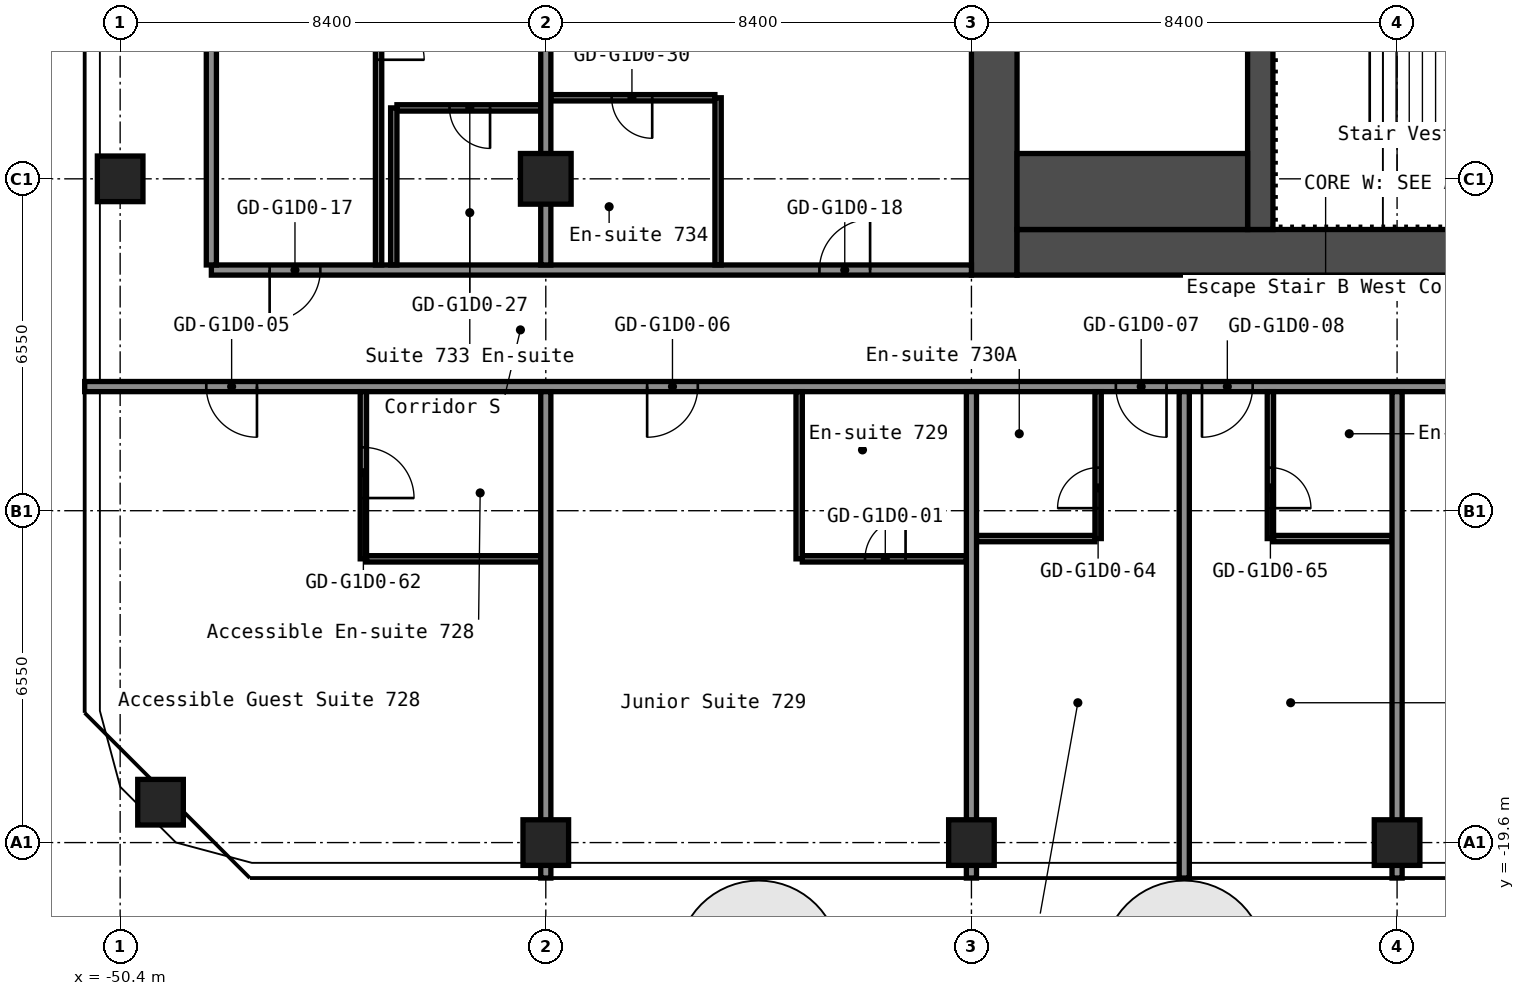
"""IFC4 building model, lengths in metres.
Left out: names, types, materials, properties, quantities, classifications, styles, units other than length and angle.
Written with IfcOpenShell. Run it as: python <this file> out.ifc"""

import sys

from ifc_helpers import new_model, si_unit, direction, frame, frame_2d, origin, origin_2d, place, context, subcontext, project, spatial, rectangle, hollow_rectangle, extrude, element, fill, save


model = new_model("IFC4")
c1 = context("Model", 3, precision=1e-05, world=origin(), true_north=direction((0.0, 1.0)))
c2 = subcontext(c1, "Body", "Model", "MODEL_VIEW")
j1 = project(units=[si_unit("LENGTHUNIT", "METRE"), si_unit("PLANEANGLEUNIT", "RADIAN")], contexts=[c1])
p1 = place(None, origin())
s1 = spatial("IfcSite", under=j1, at=p1, CompositionType="ELEMENT")
p2 = place(p1, origin())
s2 = spatial("IfcBuilding", under=s1, at=p2, CompositionType="ELEMENT")
p3 = place(p2, frame((0.0, 0.0, 29.4)))
s3 = spatial("IfcBuildingStorey", under=s2, at=p3, CompositionType="ELEMENT", Elevation=29.4)
for number, where, z_axis, x_axis in (
    (1, (-49.603, -18.803, 0.0), (0.0, 0.0, 1.0), (1.0, 0.0, 0.0)),
    (2, (-50.4, -6.5, 0.0), (0.0, 0.0, 1.0), (1.0, 0.0, 0.0)),
    (3, (-42.0, -19.6, 0.0), (0.0, 0.0, 1.0), (1.0, 0.0, 0.0)),
):
    element("IfcColumn", number, at=place(p3, frame(where, z_axis=z_axis, x_axis=x_axis)), inside=s3, PredefinedType="COLUMN", context=c2, shape_type="SweptSolid", body=[
        extrude(hollow_rectangle(XDim=0.9, YDim=0.9, WallThickness=0.036, at=origin_2d()), origin(), (0.0, 0.0, 1.0), 2.8),
    ])
p4 = place(p3, frame((-42.0, -6.5, 0.0), z_axis=(0.0, 0.0, 1.0), x_axis=(1.0, 0.0, 0.0)))
e4 = element("IfcColumn", 4, at=p4, inside=s3, PredefinedType="COLUMN", context=c2, shape_type="SweptSolid", body=[
    extrude(hollow_rectangle(XDim=1.0, YDim=1.0, WallThickness=0.04, at=origin_2d()), origin(), (0.0, 0.0, 1.0), 2.8),
])
for number, where, z_axis, x_axis in (
    (5, (-33.6, -19.6, 0.0), (0.0, 0.0, 1.0), (1.0, 0.0, 0.0)),
    (6, (-25.2, -19.6, 0.0), (0.0, 0.0, 1.0), (1.0, 0.0, 0.0)),
):
    element("IfcColumn", number, at=place(p3, frame(where, z_axis=z_axis, x_axis=x_axis)), inside=s3, PredefinedType="COLUMN", context=c2, shape_type="SweptSolid", body=[
        extrude(hollow_rectangle(XDim=0.9, YDim=0.9, WallThickness=0.036, at=origin_2d()), origin(), (0.0, 0.0, 1.0), 2.8),
    ])
p5 = place(p3, frame((-33.15, -8.4, 0.0), z_axis=(0.0, 0.0, 1.0), x_axis=(0.0, 1.0, 0.0)))
e7 = element("IfcWall", 7, at=p5, inside=s3, PredefinedType="SHEAR", context=c2, shape_type="SweptSolid", body=[
    extrude(rectangle(XDim=16.8, YDim=0.9, at=frame_2d((8.4, 0.0))), origin(), (0.0, 0.0, 1.0), 2.8),
])
p6 = place(p3, frame((-32.7, -7.95, 0.0), z_axis=(0.0, 0.0, 1.0), x_axis=(1.0, 0.0, 0.0)))
e8 = element("IfcWall", 8, at=p6, inside=s3, PredefinedType="SHEAR", context=c2, shape_type="SweptSolid", body=[
    extrude(rectangle(XDim=15.0, YDim=0.9, at=frame_2d((7.5, 0.0))), origin(), (0.0, 0.0, 1.0), 2.8),
])
p7 = place(p6, frame((11.45, 0.0, 0.0)))
e9 = element("IfcOpeningElement", 9, at=p7, cuts=e8, PredefinedType="OPENING", context=c2, shape_type="SweptSolid", body=[
    extrude(rectangle(XDim=1.0, YDim=2.1, at=frame_2d((0.5, 1.05))), frame((0.0, 0.46, 0.0), z_axis=(0.0, -1.0, 0.0), x_axis=(1.0, 0.0, 0.0)), (0.0, 0.0, 1.0), 0.92),
])
p8 = place(p3, frame((-27.9, -7.5, 0.0), z_axis=(0.0, 0.0, 1.0), x_axis=(0.0, 1.0, 0.0)))
e10 = element("IfcWall", 10, at=p8, inside=s3, PredefinedType="SHEAR", context=c2, shape_type="SweptSolid", body=[
    extrude(rectangle(XDim=3.75, YDim=0.5, at=frame_2d((1.875, 0.0))), origin(), (0.0, 0.0, 1.0), 2.8),
])
p9 = place(p3, frame((-32.7, -6.75, 0.0), z_axis=(0.0, 0.0, 1.0), x_axis=(1.0, 0.0, 0.0)))
e11 = element("IfcWall", 11, at=p9, inside=s3, PredefinedType="SHEAR", context=c2, shape_type="SweptSolid", body=[
    extrude(rectangle(XDim=4.55, YDim=1.5, at=frame_2d((2.275, 0.0))), origin(), (0.0, 0.0, 1.0), 2.8),
])
p10 = place(p3, frame((-45.538, -14.0, 0.0), z_axis=(0.0, 0.0, 1.0), x_axis=(1.0, 0.0, 0.0)))
e12 = element("IfcWall", 12, at=p10, inside=s3, PredefinedType="PARTITIONING", context=c2, shape_type="SweptSolid", body=[
    extrude(rectangle(XDim=3.438, YDim=0.125, at=frame_2d((1.719, 0.0))), origin(), (0.0, 0.0, 1.0), 2.8),
])
p11 = place(p3, frame((-36.938, -14.0, 0.0), z_axis=(0.0, 0.0, 1.0), x_axis=(1.0, 0.0, 0.0)))
e13 = element("IfcWall", 13, at=p11, inside=s3, PredefinedType="PARTITIONING", context=c2, shape_type="SweptSolid", body=[
    extrude(rectangle(XDim=3.238, YDim=0.125, at=frame_2d((1.619, 0.0))), origin(), (0.0, 0.0, 1.0), 2.8),
])
p12 = place(p11, frame((1.238, 0.0, 0.0)))
e14 = element("IfcOpeningElement", 14, at=p12, cuts=e13, PredefinedType="OPENING", context=c2, shape_type="SweptSolid", body=[
    extrude(rectangle(XDim=0.8, YDim=2.1, at=frame_2d((0.4, 1.05))), frame((0.0, 0.073, 0.0), z_axis=(0.0, -1.0, 0.0), x_axis=(1.0, 0.0, 0.0)), (0.0, 0.0, 1.0), 0.145),
])
for number, where, z_axis, x_axis in (
    (15, (-33.5, -13.6, 0.0), (0.0, 0.0, 1.0), (1.0, 0.0, 0.0)),
    (16, (-27.637, -13.6, 0.0), (0.0, 0.0, 1.0), (1.0, 0.0, 0.0)),
):
    element("IfcWall", number, at=place(p3, frame(where, z_axis=z_axis, x_axis=x_axis)), inside=s3, PredefinedType="PARTITIONING", context=c2, shape_type="SweptSolid", body=[
        extrude(rectangle(XDim=2.337, YDim=0.125, at=frame_2d((1.169, 0.0))), origin(), (0.0, 0.0, 1.0), 2.8),
    ])
p13 = place(p3, frame((-51.1, -10.6, 0.0), z_axis=(0.0, 0.0, 1.0), x_axis=(1.0, 0.0, 0.0)))
e17 = element("IfcWall", 17, at=p13, inside=s3, PredefinedType="PARTITIONING", context=c2, shape_type="SweptSolid", body=[
    extrude(rectangle(XDim=34.3, YDim=0.2, at=frame_2d((17.15, 0.0))), origin(), (0.0, 0.0, 1.0), 2.8),
])
p14 = place(p13, frame((2.4, 0.0, 0.0)))
e18 = element("IfcOpeningElement", 18, at=p14, cuts=e17, PredefinedType="OPENING", context=c2, shape_type="SweptSolid", body=[
    extrude(rectangle(XDim=1.0, YDim=2.1, at=frame_2d((0.5, 1.05))), frame((0.0, 0.11, 0.0), z_axis=(0.0, -1.0, 0.0), x_axis=(1.0, 0.0, 0.0)), (0.0, 0.0, 1.0), 0.22),
])
p15 = place(p13, frame((11.1, 0.0, 0.0)))
e19 = element("IfcOpeningElement", 19, at=p15, cuts=e17, PredefinedType="OPENING", context=c2, shape_type="SweptSolid", body=[
    extrude(rectangle(XDim=1.0, YDim=2.1, at=frame_2d((0.5, 1.05))), frame((0.0, 0.11, 0.0), z_axis=(0.0, -1.0, 0.0), x_axis=(1.0, 0.0, 0.0)), (0.0, 0.0, 1.0), 0.22),
])
p16 = place(p13, frame((20.35, 0.0, 0.0)))
e20 = element("IfcOpeningElement", 20, at=p16, cuts=e17, PredefinedType="OPENING", context=c2, shape_type="SweptSolid", body=[
    extrude(rectangle(XDim=1.0, YDim=2.1, at=frame_2d((0.5, 1.05))), frame((0.0, 0.11, 0.0), z_axis=(0.0, -1.0, 0.0), x_axis=(1.0, 0.0, 0.0)), (0.0, 0.0, 1.0), 0.22),
])
p17 = place(p13, frame((22.05, 0.0, 0.0)))
e21 = element("IfcOpeningElement", 21, at=p17, cuts=e17, PredefinedType="OPENING", context=c2, shape_type="SweptSolid", body=[
    extrude(rectangle(XDim=1.0, YDim=2.1, at=frame_2d((0.5, 1.05))), frame((0.0, 0.11, 0.0), z_axis=(0.0, -1.0, 0.0), x_axis=(1.0, 0.0, 0.0)), (0.0, 0.0, 1.0), 0.22),
])
p18 = place(p13, frame((27.9, 0.0, 0.0)))
e22 = element("IfcOpeningElement", 22, at=p18, cuts=e17, PredefinedType="OPENING", context=c2, shape_type="SweptSolid", body=[
    extrude(rectangle(XDim=1.0, YDim=2.1, at=frame_2d((0.5, 1.05))), frame((0.0, 0.11, 0.0), z_axis=(0.0, -1.0, 0.0), x_axis=(1.0, 0.0, 0.0)), (0.0, 0.0, 1.0), 0.22),
])
p19 = place(p3, frame((-48.6, -8.3, 0.0), z_axis=(0.0, 0.0, 1.0), x_axis=(1.0, 0.0, 0.0)))
e23 = element("IfcWall", 23, at=p19, inside=s3, PredefinedType="PARTITIONING", context=c2, shape_type="SweptSolid", body=[
    extrude(rectangle(XDim=15.0, YDim=0.2, at=frame_2d((7.5, 0.0))), origin(), (0.0, 0.0, 1.0), 2.8),
])
p20 = place(p19, frame((1.15, 0.0, 0.0)))
e24 = element("IfcOpeningElement", 24, at=p20, cuts=e23, PredefinedType="OPENING", context=c2, shape_type="SweptSolid", body=[
    extrude(rectangle(XDim=1.0, YDim=2.1, at=frame_2d((0.5, 1.05))), frame((0.0, 0.11, 0.0), z_axis=(0.0, -1.0, 0.0), x_axis=(1.0, 0.0, 0.0)), (0.0, 0.0, 1.0), 0.22),
])
p21 = place(p19, frame((12.0, 0.0, 0.0)))
e25 = element("IfcOpeningElement", 25, at=p21, cuts=e23, PredefinedType="OPENING", context=c2, shape_type="SweptSolid", body=[
    extrude(rectangle(XDim=1.0, YDim=2.1, at=frame_2d((0.5, 1.05))), frame((0.0, 0.11, 0.0), z_axis=(0.0, -1.0, 0.0), x_axis=(1.0, 0.0, 0.0)), (0.0, 0.0, 1.0), 0.22),
])
p22 = place(p3, frame((-44.938, -5.1, 0.0), z_axis=(0.0, 0.0, 1.0), x_axis=(1.0, 0.0, 0.0)))
e26 = element("IfcWall", 26, at=p22, inside=s3, PredefinedType="PARTITIONING", context=c2, shape_type="SweptSolid", body=[
    extrude(rectangle(XDim=2.837, YDim=0.125, at=frame_2d((1.419, 0.0))), origin(), (0.0, 0.0, 1.0), 2.8),
])
p23 = place(p22, frame((1.038, 0.0, 0.0)))
e27 = element("IfcOpeningElement", 27, at=p23, cuts=e26, PredefinedType="OPENING", context=c2, shape_type="SweptSolid", body=[
    extrude(rectangle(XDim=0.8, YDim=2.1, at=frame_2d((0.4, 1.05))), frame((0.0, 0.073, 0.0), z_axis=(0.0, -1.0, 0.0), x_axis=(1.0, 0.0, 0.0)), (0.0, 0.0, 1.0), 0.145),
])
p24 = place(p3, frame((-41.9, -4.9, 0.0), z_axis=(0.0, 0.0, 1.0), x_axis=(1.0, 0.0, 0.0)))
e28 = element("IfcWall", 28, at=p24, inside=s3, PredefinedType="PARTITIONING", context=c2, shape_type="SweptSolid", body=[
    extrude(rectangle(XDim=3.237, YDim=0.125, at=frame_2d((1.619, 0.0))), origin(), (0.0, 0.0, 1.0), 2.8),
])
p25 = place(p24, frame((1.2, 0.0, 0.0)))
e29 = element("IfcOpeningElement", 29, at=p25, cuts=e28, PredefinedType="OPENING", context=c2, shape_type="SweptSolid", body=[
    extrude(rectangle(XDim=0.8, YDim=2.1, at=frame_2d((0.4, 1.05))), frame((0.0, 0.073, 0.0), z_axis=(0.0, -1.0, 0.0), x_axis=(1.0, 0.0, 0.0)), (0.0, 0.0, 1.0), 0.145),
])
p26 = place(p3, frame((-48.6, -8.2, 0.0), z_axis=(0.0, 0.0, 1.0), x_axis=(0.0, 1.0, 0.0)))
e30 = element("IfcWall", 30, at=p26, inside=s3, PredefinedType="PARTITIONING", context=c2, shape_type="SweptSolid", body=[
    extrude(rectangle(XDim=16.4, YDim=0.2, at=frame_2d((8.2, 0.0))), origin(), (0.0, 0.0, 1.0), 2.8),
])
p27 = place(p3, frame((-45.6, -14.0, 0.0), z_axis=(0.0, 0.0, 1.0), x_axis=(0.0, 1.0, 0.0)))
e31 = element("IfcWall", 31, at=p27, inside=s3, PredefinedType="PARTITIONING", context=c2, shape_type="SweptSolid", body=[
    extrude(rectangle(XDim=3.3, YDim=0.125, at=frame_2d((1.65, 0.0))), origin(), (0.0, 0.0, 1.0), 2.8),
])
p28 = place(p27, frame((1.2, 0.0, 0.0)))
e32 = element("IfcOpeningElement", 32, at=p28, cuts=e31, PredefinedType="OPENING", context=c2, shape_type="SweptSolid", body=[
    extrude(rectangle(XDim=1.0, YDim=2.1, at=frame_2d((0.5, 1.05))), frame((0.0, 0.073, 0.0), z_axis=(0.0, -1.0, 0.0), x_axis=(1.0, 0.0, 0.0)), (0.0, 0.0, 1.0), 0.145),
])
p29 = place(p3, frame((-45.3, -8.2, 0.0), z_axis=(0.0, 0.0, 1.0), x_axis=(0.0, 1.0, 0.0)))
e33 = element("IfcWall", 33, at=p29, inside=s3, PredefinedType="PARTITIONING", context=c2, shape_type="SweptSolid", body=[
    extrude(rectangle(XDim=8.1, YDim=0.125, at=frame_2d((4.05, 0.0))), origin(), (0.0, 0.0, 1.0), 2.8),
])
p30 = place(p29, frame((4.05, 0.0, 0.0)))
e34 = element("IfcOpeningElement", 34, at=p30, cuts=e33, PredefinedType="OPENING", context=c2, shape_type="SweptSolid", body=[
    extrude(rectangle(XDim=0.9, YDim=2.1, at=frame_2d((0.45, 1.05))), frame((0.0, 0.073, 0.0), z_axis=(0.0, -1.0, 0.0), x_axis=(1.0, 0.0, 0.0)), (0.0, 0.0, 1.0), 0.145),
])
p31 = place(p3, frame((-45.0, -8.2, 0.0), z_axis=(0.0, 0.0, 1.0), x_axis=(0.0, 1.0, 0.0)))
e35 = element("IfcWall", 35, at=p31, inside=s3, PredefinedType="PARTITIONING", context=c2, shape_type="SweptSolid", body=[
    extrude(rectangle(XDim=3.1, YDim=0.125, at=frame_2d((1.55, 0.0))), origin(), (0.0, 0.0, 1.0), 2.8),
])
p32 = place(p3, frame((-42.0, -20.3, 0.0), z_axis=(0.0, 0.0, 1.0), x_axis=(0.0, 1.0, 0.0)))
e36 = element("IfcWall", 36, at=p32, inside=s3, PredefinedType="PARTITIONING", context=c2, shape_type="SweptSolid", body=[
    extrude(rectangle(XDim=9.6, YDim=0.2, at=frame_2d((4.8, 0.0))), origin(), (0.0, 0.0, 1.0), 2.8),
])
p33 = place(p3, frame((-42.0, -8.2, 0.0), z_axis=(0.0, 0.0, 1.0), x_axis=(0.0, 1.0, 0.0)))
e37 = element("IfcWall", 37, at=p33, inside=s3, PredefinedType="PARTITIONING", context=c2, shape_type="SweptSolid", body=[
    extrude(rectangle(XDim=8.2, YDim=0.2, at=frame_2d((4.1, 0.0))), origin(), (0.0, 0.0, 1.0), 2.8),
])
for number, where, z_axis, x_axis in (
    (38, (-38.6, -8.2, 0.0), (0.0, 0.0, 1.0), (0.0, 1.0, 0.0)),
    (39, (-37.0, -14.0, 0.0), (0.0, 0.0, 1.0), (0.0, 1.0, 0.0)),
):
    element("IfcWall", number, at=place(p3, frame(where, z_axis=z_axis, x_axis=x_axis)), inside=s3, PredefinedType="PARTITIONING", context=c2, shape_type="SweptSolid", body=[
        extrude(rectangle(XDim=3.3, YDim=0.125, at=frame_2d((1.65, 0.0))), origin(), (0.0, 0.0, 1.0), 2.8),
    ])
p34 = place(p3, frame((-33.6, -20.3, 0.0), z_axis=(0.0, 0.0, 1.0), x_axis=(0.0, 1.0, 0.0)))
e40 = element("IfcWall", 40, at=p34, inside=s3, PredefinedType="PARTITIONING", context=c2, shape_type="SweptSolid", body=[
    extrude(rectangle(XDim=9.6, YDim=0.2, at=frame_2d((4.8, 0.0))), origin(), (0.0, 0.0, 1.0), 2.8),
])
p35 = place(p3, frame((-31.1, -13.6, 0.0), z_axis=(0.0, 0.0, 1.0), x_axis=(0.0, 1.0, 0.0)))
e41 = element("IfcWall", 41, at=p35, inside=s3, PredefinedType="PARTITIONING", context=c2, shape_type="SweptSolid", body=[
    extrude(rectangle(XDim=2.9, YDim=0.125, at=frame_2d((1.45, 0.0))), origin(), (0.0, 0.0, 1.0), 2.8),
])
p36 = place(p35, frame((0.6, 0.0, 0.0)))
e42 = element("IfcOpeningElement", 42, at=p36, cuts=e41, PredefinedType="OPENING", context=c2, shape_type="SweptSolid", body=[
    extrude(rectangle(XDim=0.8, YDim=2.1, at=frame_2d((0.4, 1.05))), frame((0.0, 0.073, 0.0), z_axis=(0.0, -1.0, 0.0), x_axis=(1.0, 0.0, 0.0)), (0.0, 0.0, 1.0), 0.145),
])
p37 = place(p3, frame((-29.4, -20.3, 0.0), z_axis=(0.0, 0.0, 1.0), x_axis=(0.0, 1.0, 0.0)))
e43 = element("IfcWall", 43, at=p37, inside=s3, PredefinedType="PARTITIONING", context=c2, shape_type="SweptSolid", body=[
    extrude(rectangle(XDim=9.6, YDim=0.2, at=frame_2d((4.8, 0.0))), origin(), (0.0, 0.0, 1.0), 2.8),
])
p38 = place(p3, frame((-27.7, -13.6, 0.0), z_axis=(0.0, 0.0, 1.0), x_axis=(0.0, 1.0, 0.0)))
e44 = element("IfcWall", 44, at=p38, inside=s3, PredefinedType="PARTITIONING", context=c2, shape_type="SweptSolid", body=[
    extrude(rectangle(XDim=2.9, YDim=0.125, at=frame_2d((1.45, 0.0))), origin(), (0.0, 0.0, 1.0), 2.8),
])
p39 = place(p38, frame((0.6, 0.0, 0.0)))
e45 = element("IfcOpeningElement", 45, at=p39, cuts=e44, PredefinedType="OPENING", context=c2, shape_type="SweptSolid", body=[
    extrude(rectangle(XDim=0.8, YDim=2.1, at=frame_2d((0.4, 1.05))), frame((0.0, 0.073, 0.0), z_axis=(0.0, -1.0, 0.0), x_axis=(1.0, 0.0, 0.0)), (0.0, 0.0, 1.0), 0.145),
])
p40 = place(p3, frame((-25.2, -20.3, 0.0), z_axis=(0.0, 0.0, 1.0), x_axis=(0.0, 1.0, 0.0)))
e46 = element("IfcWall", 46, at=p40, inside=s3, PredefinedType="PARTITIONING", context=c2, shape_type="SweptSolid", body=[
    extrude(rectangle(XDim=9.6, YDim=0.2, at=frame_2d((4.8, 0.0))), origin(), (0.0, 0.0, 1.0), 2.8),
])
p41 = place(p12, origin())
e47 = element("IfcDoor", 47, at=p41, inside=s3, OperationType="SINGLE_SWING_LEFT", PredefinedType="DOOR", context=c2, shape_type="SweptSolid", body=[
    extrude(rectangle(XDim=0.8, YDim=2.1, at=frame_2d((0.4, 1.05))), frame((0.0, 0.025, 0.0), z_axis=(0.0, -1.0, 0.0), x_axis=(1.0, 0.0, 0.0)), (0.0, 0.0, 1.0), 0.05),
])
fill(e14, e47)
p42 = place(p14, origin())
e48 = element("IfcDoor", 48, at=p42, inside=s3, OperationType="SINGLE_SWING_RIGHT", PredefinedType="DOOR", context=c2, shape_type="SweptSolid", body=[
    extrude(rectangle(XDim=1.0, YDim=2.1, at=frame_2d((0.5, 1.05))), frame((0.0, 0.025, 0.0), z_axis=(0.0, -1.0, 0.0), x_axis=(1.0, 0.0, 0.0)), (0.0, 0.0, 1.0), 0.05),
])
fill(e18, e48)
p43 = place(p15, origin())
e49 = element("IfcDoor", 49, at=p43, inside=s3, OperationType="SINGLE_SWING_LEFT", PredefinedType="DOOR", context=c2, shape_type="SweptSolid", body=[
    extrude(rectangle(XDim=1.0, YDim=2.1, at=frame_2d((0.5, 1.05))), frame((0.0, 0.025, 0.0), z_axis=(0.0, -1.0, 0.0), x_axis=(1.0, 0.0, 0.0)), (0.0, 0.0, 1.0), 0.05),
])
fill(e19, e49)
p44 = place(p16, origin())
e50 = element("IfcDoor", 50, at=p44, inside=s3, OperationType="SINGLE_SWING_RIGHT", PredefinedType="DOOR", context=c2, shape_type="SweptSolid", body=[
    extrude(rectangle(XDim=1.0, YDim=2.1, at=frame_2d((0.5, 1.05))), frame((0.0, 0.025, 0.0), z_axis=(0.0, -1.0, 0.0), x_axis=(1.0, 0.0, 0.0)), (0.0, 0.0, 1.0), 0.05),
])
fill(e20, e50)
p45 = place(p17, origin())
e51 = element("IfcDoor", 51, at=p45, inside=s3, OperationType="SINGLE_SWING_LEFT", PredefinedType="DOOR", context=c2, shape_type="SweptSolid", body=[
    extrude(rectangle(XDim=1.0, YDim=2.1, at=frame_2d((0.5, 1.05))), frame((0.0, 0.025, 0.0), z_axis=(0.0, -1.0, 0.0), x_axis=(1.0, 0.0, 0.0)), (0.0, 0.0, 1.0), 0.05),
])
fill(e21, e51)
p46 = place(p20, origin())
e52 = element("IfcDoor", 52, at=p46, inside=s3, OperationType="SINGLE_SWING_LEFT", PredefinedType="DOOR", context=c2, shape_type="SweptSolid", body=[
    extrude(rectangle(XDim=1.0, YDim=2.1, at=frame_2d((0.5, 1.05))), frame((0.0, 0.025, 0.0), z_axis=(0.0, -1.0, 0.0), x_axis=(1.0, 0.0, 0.0)), (0.0, 0.0, 1.0), 0.05),
])
fill(e24, e52)
p47 = place(p21, origin())
e53 = element("IfcDoor", 53, at=p47, inside=s3, OperationType="SINGLE_SWING_LEFT", PredefinedType="DOOR", context=c2, shape_type="SweptSolid", body=[
    extrude(rectangle(XDim=1.0, YDim=2.1, at=frame_2d((0.5, 1.05))), frame((0.0, 0.025, 0.0), z_axis=(0.0, -1.0, 0.0), x_axis=(1.0, 0.0, 0.0)), (0.0, 0.0, 1.0), 0.05),
])
fill(e25, e53)
p48 = place(p23, origin())
e54 = element("IfcDoor", 54, at=p48, inside=s3, OperationType="SINGLE_SWING_RIGHT", PredefinedType="DOOR", context=c2, shape_type="SweptSolid", body=[
    extrude(rectangle(XDim=0.8, YDim=2.1, at=frame_2d((0.4, 1.05))), frame((0.0, 0.025, 0.0), z_axis=(0.0, -1.0, 0.0), x_axis=(1.0, 0.0, 0.0)), (0.0, 0.0, 1.0), 0.05),
])
fill(e27, e54)
p49 = place(p25, origin())
e55 = element("IfcDoor", 55, at=p49, inside=s3, OperationType="SINGLE_SWING_RIGHT", PredefinedType="DOOR", context=c2, shape_type="SweptSolid", body=[
    extrude(rectangle(XDim=0.8, YDim=2.1, at=frame_2d((0.4, 1.05))), frame((0.0, 0.025, 0.0), z_axis=(0.0, -1.0, 0.0), x_axis=(1.0, 0.0, 0.0)), (0.0, 0.0, 1.0), 0.05),
])
fill(e29, e55)
p50 = place(p28, origin())
e56 = element("IfcDoor", 56, at=p50, inside=s3, OperationType="SINGLE_SWING_LEFT", PredefinedType="DOOR", context=c2, shape_type="SweptSolid", body=[
    extrude(rectangle(XDim=1.0, YDim=2.1, at=frame_2d((0.5, 1.05))), frame((0.0, 0.025, 0.0), z_axis=(0.0, -1.0, 0.0), x_axis=(1.0, 0.0, 0.0)), (0.0, 0.0, 1.0), 0.05),
])
fill(e32, e56)
p51 = place(p30, origin())
e57 = element("IfcDoor", 57, at=p51, inside=s3, OperationType="SINGLE_SWING_LEFT", PredefinedType="DOOR", context=c2, shape_type="SweptSolid", body=[
    extrude(rectangle(XDim=0.9, YDim=2.1, at=frame_2d((0.45, 1.05))), frame((0.0, 0.025, 0.0), z_axis=(0.0, -1.0, 0.0), x_axis=(1.0, 0.0, 0.0)), (0.0, 0.0, 1.0), 0.05),
])
fill(e34, e57)
p52 = place(p36, origin())
e58 = element("IfcDoor", 58, at=p52, inside=s3, OperationType="SINGLE_SWING_RIGHT", PredefinedType="DOOR", context=c2, shape_type="SweptSolid", body=[
    extrude(rectangle(XDim=0.8, YDim=2.1, at=frame_2d((0.4, 1.05))), frame((0.0, 0.025, 0.0), z_axis=(0.0, -1.0, 0.0), x_axis=(1.0, 0.0, 0.0)), (0.0, 0.0, 1.0), 0.05),
])
fill(e42, e58)
p53 = place(p39, origin())
e59 = element("IfcDoor", 59, at=p53, inside=s3, OperationType="SINGLE_SWING_LEFT", PredefinedType="DOOR", context=c2, shape_type="SweptSolid", body=[
    extrude(rectangle(XDim=0.8, YDim=2.1, at=frame_2d((0.4, 1.05))), frame((0.0, 0.025, 0.0), z_axis=(0.0, -1.0, 0.0), x_axis=(1.0, 0.0, 0.0)), (0.0, 0.0, 1.0), 0.05),
])
fill(e45, e59)
save(model, sys.argv[1])
